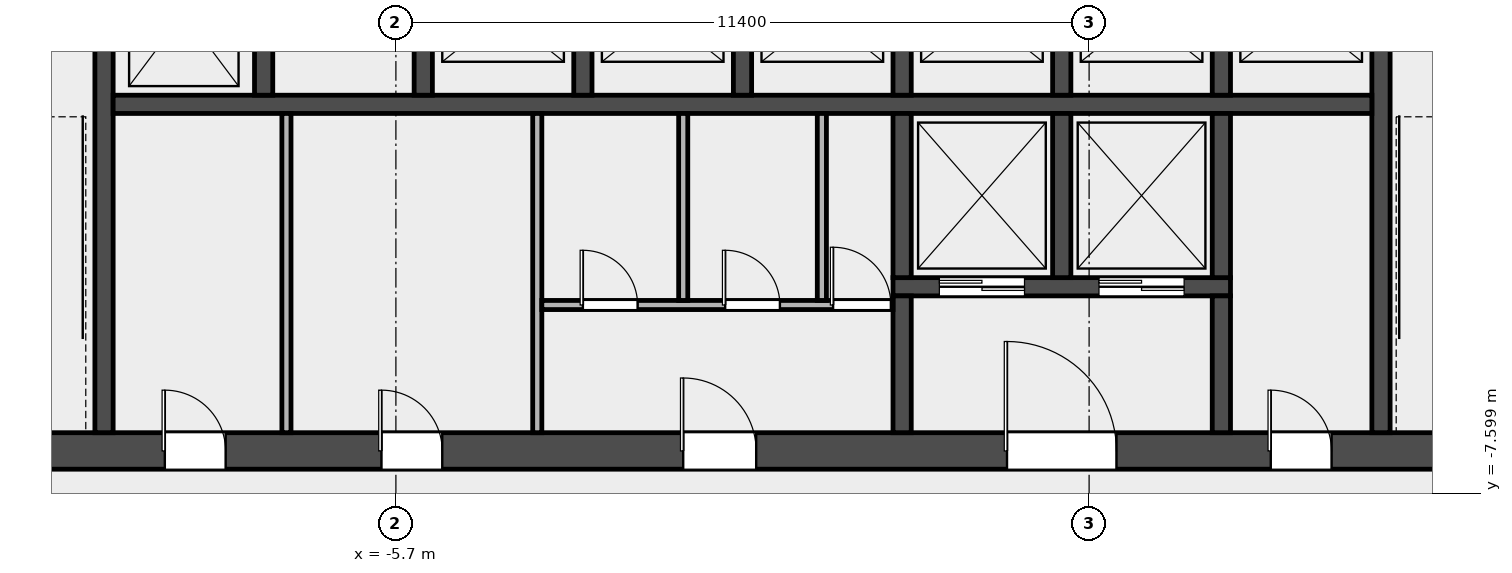
"""IFC4 building model, lengths in metres.
Left out: names, types, materials, properties, quantities, classifications, styles, units other than length and angle.
Written with IfcOpenShell. Run it as: python <this file> out.ifc"""

import sys

from ifc_helpers import new_model, si_unit, direction, frame, frame_2d, origin, place, context, subcontext, project, spatial, rectangle, extrude, element, fill, save


model = new_model("IFC4")
c1 = context("Model", 3, precision=1e-05, world=origin(), true_north=direction((0.0, 1.0)))
c2 = subcontext(c1, "Body", "Model", "MODEL_VIEW")
j1 = project(units=[si_unit("LENGTHUNIT", "METRE"), si_unit("PLANEANGLEUNIT", "RADIAN")], contexts=[c1])
p1 = place(None, origin())
s1 = spatial("IfcSite", under=j1, at=p1, CompositionType="ELEMENT")
p2 = place(p1, origin())
s2 = spatial("IfcBuilding", under=s1, at=p2, CompositionType="ELEMENT")
p3 = place(p2, frame((0.0, 0.0, 45.4)))
s3 = spatial("IfcBuildingStorey", under=s2, at=p3, CompositionType="ELEMENT", Elevation=45.4)
p4 = place(p3, frame((-14.4, -6.9, 0.0), z_axis=(0.0, 0.0, 1.0), x_axis=(1.0, 0.0, 0.0)))
e1 = element("IfcWall", 1, at=p4, inside=s3, PredefinedType="SHEAR", context=c2, shape_type="SweptSolid", body=[
    extrude(rectangle(XDim=28.8, YDim=0.6, at=frame_2d((14.4, 0.0))), origin(), (0.0, 0.0, 1.0), 4.5),
])
p5 = place(p4, frame((4.9, 0.0, 0.0)))
e2 = element("IfcOpeningElement", 2, at=p5, cuts=e1, PredefinedType="OPENING", context=c2, shape_type="SweptSolid", body=[
    extrude(rectangle(XDim=1.0, YDim=2.1, at=frame_2d((0.5, 1.05))), frame((0.0, 0.312, 0.0), z_axis=(0.0, -1.0, 0.0), x_axis=(1.0, 0.0, 0.0)), (0.0, 0.0, 1.0), 0.624),
])
p6 = place(p4, frame((8.462, 0.0, 0.0)))
e3 = element("IfcOpeningElement", 3, at=p6, cuts=e1, PredefinedType="OPENING", context=c2, shape_type="SweptSolid", body=[
    extrude(rectangle(XDim=1.0, YDim=2.1, at=frame_2d((0.5, 1.05))), frame((0.0, 0.312, 0.0), z_axis=(0.0, -1.0, 0.0), x_axis=(1.0, 0.0, 0.0)), (0.0, 0.0, 1.0), 0.624),
])
p7 = place(p4, frame((13.425, 0.0, 0.0)))
e4 = element("IfcOpeningElement", 4, at=p7, cuts=e1, PredefinedType="OPENING", context=c2, shape_type="SweptSolid", body=[
    extrude(rectangle(XDim=1.2, YDim=2.1, at=frame_2d((0.6, 1.05))), frame((0.0, 0.312, 0.0), z_axis=(0.0, -1.0, 0.0), x_axis=(1.0, 0.0, 0.0)), (0.0, 0.0, 1.0), 0.624),
])
p8 = place(p4, frame((18.75, 0.0, 0.0)))
e5 = element("IfcOpeningElement", 5, at=p8, cuts=e1, PredefinedType="OPENING", context=c2, shape_type="SweptSolid", body=[
    extrude(rectangle(XDim=1.8, YDim=2.1, at=frame_2d((0.9, 1.05))), frame((0.0, 0.312, 0.0), z_axis=(0.0, -1.0, 0.0), x_axis=(1.0, 0.0, 0.0)), (0.0, 0.0, 1.0), 0.624),
])
p9 = place(p4, frame((23.087, 0.0, 0.0)))
e6 = element("IfcOpeningElement", 6, at=p9, cuts=e1, PredefinedType="OPENING", context=c2, shape_type="SweptSolid", body=[
    extrude(rectangle(XDim=1.0, YDim=2.1, at=frame_2d((0.5, 1.05))), frame((0.0, 0.312, 0.0), z_axis=(0.0, -1.0, 0.0), x_axis=(1.0, 0.0, 0.0)), (0.0, 0.0, 1.0), 0.624),
])
for number, where, z_axis, x_axis in (
    (7, (-10.5, -6.6, 0.0), (0.0, 0.0, 1.0), (0.0, 1.0, 0.0)),
    (8, (10.5, -6.6, 0.0), (0.0, 0.0, 1.0), (0.0, 1.0, 0.0)),
):
    element("IfcWall", number, at=place(p3, frame(where, z_axis=z_axis, x_axis=x_axis)), inside=s3, PredefinedType="SHEAR", context=c2, shape_type="SweptSolid", body=[
        extrude(rectangle(XDim=8.55, YDim=0.3, at=frame_2d((4.275, 0.0))), origin(), (0.0, 0.0, 1.0), 4.5),
    ])
p10 = place(p3, frame((-10.35, -1.2, 0.0), z_axis=(0.0, 0.0, 1.0), x_axis=(1.0, 0.0, 0.0)))
e9 = element("IfcWall", 9, at=p10, inside=s3, PredefinedType="SOLIDWALL", context=c2, shape_type="SweptSolid", body=[
    extrude(rectangle(XDim=20.7, YDim=0.3, at=frame_2d((10.35, 0.0))), origin(), (0.0, 0.0, 1.0), 4.5),
])
for number, where, z_axis, x_axis in (
    (10, (-7.875, -1.05, 0.0), (0.0, 0.0, 1.0), (0.0, 1.0, 0.0)),
    (11, (-5.25, -1.05, 0.0), (0.0, 0.0, 1.0), (0.0, 1.0, 0.0)),
    (12, (-2.625, -1.05, 0.0), (0.0, 0.0, 1.0), (0.0, 1.0, 0.0)),
    (13, (0.0, -1.05, 0.0), (0.0, 0.0, 1.0), (0.0, 1.0, 0.0)),
    (14, (2.625, -1.05, 0.0), (0.0, 0.0, 1.0), (0.0, 1.0, 0.0)),
    (15, (5.25, -1.05, 0.0), (0.0, 0.0, 1.0), (0.0, 1.0, 0.0)),
    (16, (7.875, -1.05, 0.0), (0.0, 0.0, 1.0), (0.0, 1.0, 0.0)),
):
    element("IfcWall", number, at=place(p3, frame(where, z_axis=z_axis, x_axis=x_axis)), inside=s3, PredefinedType="SOLIDWALL", context=c2, shape_type="SweptSolid", body=[
        extrude(rectangle(XDim=2.7, YDim=0.3, at=frame_2d((1.35, 0.0))), origin(), (0.0, 0.0, 1.0), 4.5),
    ])
p11 = place(p3, frame((2.475, -4.2, 0.0), z_axis=(0.0, 0.0, 1.0), x_axis=(1.0, 0.0, 0.0)))
e17 = element("IfcWall", 17, at=p11, inside=s3, PredefinedType="SOLIDWALL", context=c2, shape_type="SweptSolid", body=[
    extrude(rectangle(XDim=5.55, YDim=0.3, at=frame_2d((2.775, 0.0))), origin(), (0.0, 0.0, 1.0), 4.5),
])
p12 = place(p11, frame((0.762, 0.0, 0.0)))
e18 = element("IfcOpeningElement", 18, at=p12, cuts=e17, PredefinedType="OPENING", context=c2, shape_type="SweptSolid", body=[
    extrude(rectangle(XDim=1.4, YDim=2.1, at=frame_2d((0.7, 1.05))), frame((0.0, 0.162, 0.0), z_axis=(0.0, -1.0, 0.0), x_axis=(1.0, 0.0, 0.0)), (0.0, 0.0, 1.0), 0.324),
])
p13 = place(p11, frame((3.387, 0.0, 0.0)))
e19 = element("IfcOpeningElement", 19, at=p13, cuts=e17, PredefinedType="OPENING", context=c2, shape_type="SweptSolid", body=[
    extrude(rectangle(XDim=1.4, YDim=2.1, at=frame_2d((0.7, 1.05))), frame((0.0, 0.162, 0.0), z_axis=(0.0, -1.0, 0.0), x_axis=(1.0, 0.0, 0.0)), (0.0, 0.0, 1.0), 0.324),
])
p14 = place(p3, frame((2.625, -4.05, 0.0), z_axis=(0.0, 0.0, 1.0), x_axis=(0.0, 1.0, 0.0)))
e20 = element("IfcWall", 20, at=p14, inside=s3, PredefinedType="SOLIDWALL", context=c2, shape_type="SweptSolid", body=[
    extrude(rectangle(XDim=2.7, YDim=0.3, at=frame_2d((1.35, 0.0))), origin(), (0.0, 0.0, 1.0), 4.5),
])
p15 = place(p3, frame((2.625, -6.6, 0.0), z_axis=(0.0, 0.0, 1.0), x_axis=(0.0, 1.0, 0.0)))
e21 = element("IfcWall", 21, at=p15, inside=s3, PredefinedType="SOLIDWALL", context=c2, shape_type="SweptSolid", body=[
    extrude(rectangle(XDim=2.25, YDim=0.3, at=frame_2d((1.125, 0.0))), origin(), (0.0, 0.0, 1.0), 4.5),
])
for number, where, z_axis, x_axis in (
    (22, (5.25, -4.05, 0.0), (0.0, 0.0, 1.0), (0.0, 1.0, 0.0)),
    (23, (7.875, -4.05, 0.0), (0.0, 0.0, 1.0), (0.0, 1.0, 0.0)),
):
    element("IfcWall", number, at=place(p3, frame(where, z_axis=z_axis, x_axis=x_axis)), inside=s3, PredefinedType="SOLIDWALL", context=c2, shape_type="SweptSolid", body=[
        extrude(rectangle(XDim=2.7, YDim=0.3, at=frame_2d((1.35, 0.0))), origin(), (0.0, 0.0, 1.0), 4.5),
    ])
p16 = place(p3, frame((7.875, -6.6, 0.0), z_axis=(0.0, 0.0, 1.0), x_axis=(0.0, 1.0, 0.0)))
e24 = element("IfcWall", 24, at=p16, inside=s3, PredefinedType="SOLIDWALL", context=c2, shape_type="SweptSolid", body=[
    extrude(rectangle(XDim=2.25, YDim=0.3, at=frame_2d((1.125, 0.0))), origin(), (0.0, 0.0, 1.0), 4.5),
])
for number, where, z_axis, x_axis in (
    (25, (-7.5, -6.6, 0.0), (0.0, 0.0, 1.0), (0.0, 1.0, 0.0)),
    (26, (-3.375, -6.6, 0.0), (0.0, 0.0, 1.0), (0.0, 1.0, 0.0)),
):
    element("IfcWall", number, at=place(p3, frame(where, z_axis=z_axis, x_axis=x_axis)), inside=s3, PredefinedType="PARTITIONING", context=c2, shape_type="SweptSolid", body=[
        extrude(rectangle(XDim=5.25, YDim=0.15, at=frame_2d((2.625, 0.0))), origin(), (0.0, 0.0, 1.0), 4.5),
    ])
p17 = place(p3, frame((-3.3, -4.5, 0.0), z_axis=(0.0, 0.0, 1.0), x_axis=(1.0, 0.0, 0.0)))
e27 = element("IfcWall", 27, at=p17, inside=s3, PredefinedType="PARTITIONING", context=c2, shape_type="SweptSolid", body=[
    extrude(rectangle(XDim=5.775, YDim=0.15, at=frame_2d((2.888, 0.0))), origin(), (0.0, 0.0, 1.0), 4.5),
])
p18 = place(p17, frame((0.675, 0.0, 0.0)))
e28 = element("IfcOpeningElement", 28, at=p18, cuts=e27, PredefinedType="OPENING", context=c2, shape_type="SweptSolid", body=[
    extrude(rectangle(XDim=0.9, YDim=2.1, at=frame_2d((0.45, 1.05))), frame((0.0, 0.087, 0.0), z_axis=(0.0, -1.0, 0.0), x_axis=(1.0, 0.0, 0.0)), (0.0, 0.0, 1.0), 0.174),
])
p19 = place(p17, frame((3.015, 0.0, 0.0)))
e29 = element("IfcOpeningElement", 29, at=p19, cuts=e27, PredefinedType="OPENING", context=c2, shape_type="SweptSolid", body=[
    extrude(rectangle(XDim=0.9, YDim=2.1, at=frame_2d((0.45, 1.05))), frame((0.0, 0.087, 0.0), z_axis=(0.0, -1.0, 0.0), x_axis=(1.0, 0.0, 0.0)), (0.0, 0.0, 1.0), 0.174),
])
p20 = place(p17, frame((4.79, 0.0, 0.0)))
e30 = element("IfcOpeningElement", 30, at=p20, cuts=e27, PredefinedType="OPENING", context=c2, shape_type="SweptSolid", body=[
    extrude(rectangle(XDim=0.95, YDim=2.1, at=frame_2d((0.475, 1.05))), frame((0.0, 0.087, 0.0), z_axis=(0.0, -1.0, 0.0), x_axis=(1.0, 0.0, 0.0)), (0.0, 0.0, 1.0), 0.174),
])
for number, where, z_axis, x_axis in (
    (31, (-0.975, -4.425, 0.0), (0.0, 0.0, 1.0), (0.0, 1.0, 0.0)),
    (32, (1.305, -4.425, 0.0), (0.0, 0.0, 1.0), (0.0, 1.0, 0.0)),
):
    element("IfcWall", number, at=place(p3, frame(where, z_axis=z_axis, x_axis=x_axis)), inside=s3, PredefinedType="PARTITIONING", context=c2, shape_type="SweptSolid", body=[
        extrude(rectangle(XDim=3.075, YDim=0.15, at=frame_2d((1.538, 0.0))), origin(), (0.0, 0.0, 1.0), 4.5),
    ])
p21 = place(p12, origin())
e33 = element("IfcDoor", 33, at=p21, inside=s3, OperationType="DOUBLE_DOOR_SLIDING", PredefinedType="DOOR", context=c2, shape_type="SweptSolid", body=[
    extrude(rectangle(XDim=1.4, YDim=2.1, at=frame_2d((0.7, 1.05))), frame((0.0, 0.025, 0.0), z_axis=(0.0, -1.0, 0.0), x_axis=(1.0, 0.0, 0.0)), (0.0, 0.0, 1.0), 0.05),
])
fill(e18, e33)
p22 = place(p13, origin())
e34 = element("IfcDoor", 34, at=p22, inside=s3, OperationType="DOUBLE_DOOR_SLIDING", PredefinedType="DOOR", context=c2, shape_type="SweptSolid", body=[
    extrude(rectangle(XDim=1.4, YDim=2.1, at=frame_2d((0.7, 1.05))), frame((0.0, 0.025, 0.0), z_axis=(0.0, -1.0, 0.0), x_axis=(1.0, 0.0, 0.0)), (0.0, 0.0, 1.0), 0.05),
])
fill(e19, e34)
p23 = place(p5, origin())
e35 = element("IfcDoor", 35, at=p23, inside=s3, OperationType="SINGLE_SWING_LEFT", PredefinedType="DOOR", context=c2, shape_type="SweptSolid", body=[
    extrude(rectangle(XDim=1.0, YDim=2.1, at=frame_2d((0.5, 1.05))), frame((0.0, 0.025, 0.0), z_axis=(0.0, -1.0, 0.0), x_axis=(1.0, 0.0, 0.0)), (0.0, 0.0, 1.0), 0.05),
])
fill(e2, e35)
p24 = place(p6, origin())
e36 = element("IfcDoor", 36, at=p24, inside=s3, OperationType="SINGLE_SWING_LEFT", PredefinedType="DOOR", context=c2, shape_type="SweptSolid", body=[
    extrude(rectangle(XDim=1.0, YDim=2.1, at=frame_2d((0.5, 1.05))), frame((0.0, 0.025, 0.0), z_axis=(0.0, -1.0, 0.0), x_axis=(1.0, 0.0, 0.0)), (0.0, 0.0, 1.0), 0.05),
])
fill(e3, e36)
p25 = place(p7, origin())
e37 = element("IfcDoor", 37, at=p25, inside=s3, OperationType="SINGLE_SWING_LEFT", PredefinedType="DOOR", context=c2, shape_type="SweptSolid", body=[
    extrude(rectangle(XDim=1.2, YDim=2.1, at=frame_2d((0.6, 1.05))), frame((0.0, 0.025, 0.0), z_axis=(0.0, -1.0, 0.0), x_axis=(1.0, 0.0, 0.0)), (0.0, 0.0, 1.0), 0.05),
])
fill(e4, e37)
p26 = place(p18, origin())
e38 = element("IfcDoor", 38, at=p26, inside=s3, OperationType="SINGLE_SWING_LEFT", PredefinedType="DOOR", context=c2, shape_type="SweptSolid", body=[
    extrude(rectangle(XDim=0.9, YDim=2.1, at=frame_2d((0.45, 1.05))), frame((0.0, 0.025, 0.0), z_axis=(0.0, -1.0, 0.0), x_axis=(1.0, 0.0, 0.0)), (0.0, 0.0, 1.0), 0.05),
])
fill(e28, e38)
p27 = place(p19, origin())
e39 = element("IfcDoor", 39, at=p27, inside=s3, OperationType="SINGLE_SWING_LEFT", PredefinedType="DOOR", context=c2, shape_type="SweptSolid", body=[
    extrude(rectangle(XDim=0.9, YDim=2.1, at=frame_2d((0.45, 1.05))), frame((0.0, 0.025, 0.0), z_axis=(0.0, -1.0, 0.0), x_axis=(1.0, 0.0, 0.0)), (0.0, 0.0, 1.0), 0.05),
])
fill(e29, e39)
p28 = place(p20, origin())
e40 = element("IfcDoor", 40, at=p28, inside=s3, OperationType="SINGLE_SWING_LEFT", PredefinedType="DOOR", context=c2, shape_type="SweptSolid", body=[
    extrude(rectangle(XDim=0.95, YDim=2.1, at=frame_2d((0.475, 1.05))), frame((0.0, 0.025, 0.0), z_axis=(0.0, -1.0, 0.0), x_axis=(1.0, 0.0, 0.0)), (0.0, 0.0, 1.0), 0.05),
])
fill(e30, e40)
p29 = place(p8, origin())
e41 = element("IfcDoor", 41, at=p29, inside=s3, OperationType="DOUBLE_DOOR_SINGLE_SWING", PredefinedType="DOOR", context=c2, shape_type="SweptSolid", body=[
    extrude(rectangle(XDim=1.8, YDim=2.1, at=frame_2d((0.9, 1.05))), frame((0.0, 0.025, 0.0), z_axis=(0.0, -1.0, 0.0), x_axis=(1.0, 0.0, 0.0)), (0.0, 0.0, 1.0), 0.05),
])
fill(e5, e41)
p30 = place(p9, origin())
e42 = element("IfcDoor", 42, at=p30, inside=s3, OperationType="SINGLE_SWING_LEFT", PredefinedType="DOOR", context=c2, shape_type="SweptSolid", body=[
    extrude(rectangle(XDim=1.0, YDim=2.1, at=frame_2d((0.5, 1.05))), frame((0.0, 0.025, 0.0), z_axis=(0.0, -1.0, 0.0), x_axis=(1.0, 0.0, 0.0)), (0.0, 0.0, 1.0), 0.05),
])
fill(e6, e42)
save(model, sys.argv[1])
